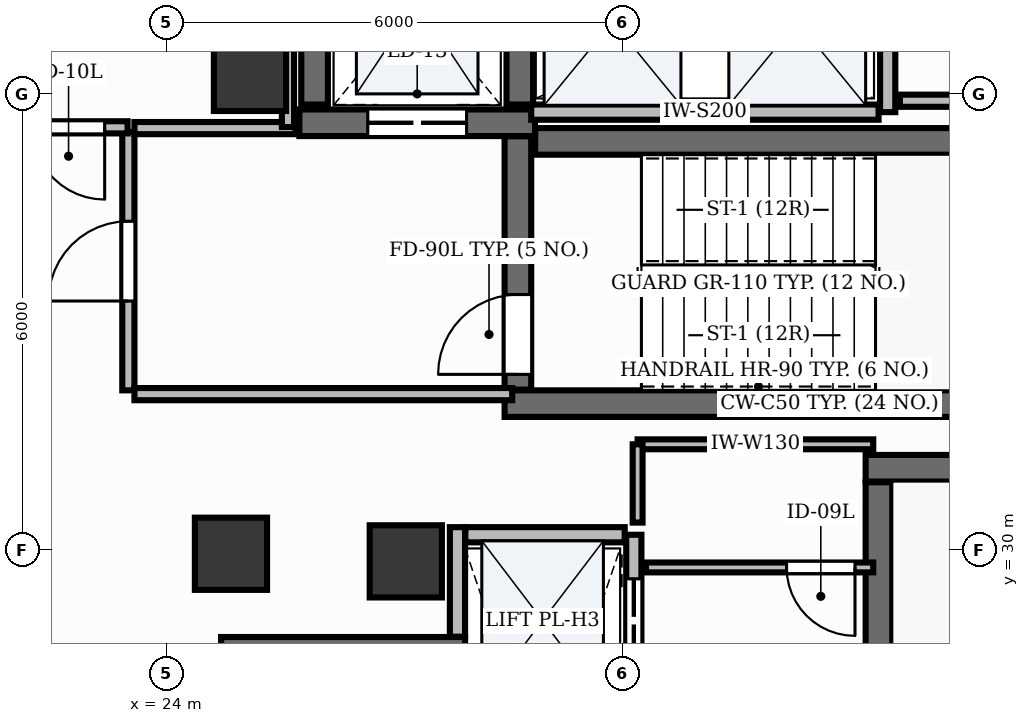
"""IFC4 building model, lengths in metres.
Left out: names, types, materials, properties, quantities, classifications, styles, units other than length and angle.
Written with IfcOpenShell. Run it as: python <this file> out.ifc"""

import sys

from ifc_helpers import new_model, si_unit, direction, frame, frame_2d, origin, origin_2d, place, context, subcontext, project, spatial, rectangle, extrude, element, fill, save


model = new_model("IFC4")
c1 = context("Model", 3, precision=1e-05, world=origin(), true_north=direction((0.0, 1.0)))
c2 = subcontext(c1, "Body", "Model", "MODEL_VIEW")
j1 = project(units=[si_unit("LENGTHUNIT", "METRE"), si_unit("PLANEANGLEUNIT", "RADIAN")], contexts=[c1])
p1 = place(None, origin())
s1 = spatial("IfcSite", under=j1, at=p1, CompositionType="ELEMENT")
p2 = place(p1, origin())
s2 = spatial("IfcBuilding", under=s1, at=p2, CompositionType="ELEMENT")
p3 = place(p2, frame((0.0, 0.0, 331.2)))
s3 = spatial("IfcBuildingStorey", under=s2, at=p3, CompositionType="ELEMENT", Elevation=331.2)
p4 = place(p3, frame((28.852, 35.375, 0.0), z_axis=(0.0, 0.0, 1.0), x_axis=(1.0, 0.0, 0.0)))
e1 = element("IfcWall", 1, at=p4, inside=s3, PredefinedType="SHEAR", context=c2, shape_type="SweptSolid", body=[
    extrude(rectangle(XDim=8.148, YDim=0.35, at=frame_2d((4.074, 0.0))), origin(), (0.0, 0.0, 1.0), 3.88),
])
p5 = place(p3, frame((28.45, 31.925, 0.0), z_axis=(0.0, 0.0, 1.0), x_axis=(1.0, 0.0, 0.0)))
e2 = element("IfcWall", 2, at=p5, inside=s3, PredefinedType="SHEAR", context=c2, shape_type="SweptSolid", body=[
    extrude(rectangle(XDim=8.55, YDim=0.35, at=frame_2d((4.275, 0.0))), origin(), (0.0, 0.0, 1.0), 3.88),
])
p6 = place(p3, frame((28.625, 32.11, 0.0), z_axis=(0.0, 0.0, 1.0), x_axis=(0.0, 1.0, 0.0)))
e3 = element("IfcWall", 3, at=p6, inside=s3, PredefinedType="SHEAR", context=c2, shape_type="SweptSolid", body=[
    extrude(rectangle(XDim=3.333, YDim=0.35, at=frame_2d((1.667, 0.0))), origin(), (0.0, 0.0, 1.0), 3.88),
])
p7 = place(p6, frame((0.2, 0.0, 0.0)))
e4 = element("IfcOpeningElement", 4, at=p7, cuts=e3, PredefinedType="OPENING", context=c2, shape_type="SweptSolid", body=[
    extrude(rectangle(XDim=1.05, YDim=2.15, at=frame_2d((0.525, 1.075))), frame((0.0, 0.19, 0.0), z_axis=(0.0, -1.0, 0.0), x_axis=(1.0, 0.0, 0.0)), (0.0, 0.0, 1.0), 0.38),
])
p8 = place(p3, frame((33.2, 31.075, 0.0), z_axis=(0.0, 0.0, 1.0), x_axis=(1.0, 0.0, 0.0)))
e5 = element("IfcWall", 5, at=p8, inside=s3, PredefinedType="SHEAR", context=c2, shape_type="SweptSolid", body=[
    extrude(rectangle(XDim=3.8, YDim=0.35, at=frame_2d((1.9, 0.0))), origin(), (0.0, 0.0, 1.0), 3.88),
])
p9 = place(p3, frame((33.375, 23.11, 0.0), z_axis=(0.0, 0.0, 1.0), x_axis=(0.0, 1.0, 0.0)))
e6 = element("IfcWall", 6, at=p9, inside=s3, PredefinedType="SHEAR", context=c2, shape_type="SweptSolid", body=[
    extrude(rectangle(XDim=7.78, YDim=0.35, at=frame_2d((3.89, 0.0))), origin(), (0.0, 0.0, 1.0), 3.88),
])
p10 = place(p9, frame((0.2, 0.0, 0.0)))
e7 = element("IfcOpeningElement", 7, at=p10, cuts=e6, PredefinedType="OPENING", context=c2, shape_type="SweptSolid", body=[
    extrude(rectangle(XDim=1.05, YDim=2.15, at=frame_2d((0.525, 1.075))), frame((0.0, 0.19, 0.0), z_axis=(0.0, -1.0, 0.0), x_axis=(1.0, 0.0, 0.0)), (0.0, 0.0, 1.0), 0.38),
])
p11 = place(p3, frame((25.75, 35.62, 0.0), z_axis=(0.0, 0.0, 1.0), x_axis=(1.0, 0.0, 0.0)))
e8 = element("IfcWall", 8, at=p11, inside=s3, PredefinedType="SHEAR", context=c2, shape_type="SweptSolid", body=[
    extrude(rectangle(XDim=3.1, YDim=0.35, at=frame_2d((1.55, 0.0))), origin(), (0.0, 0.0, 1.0), 3.88),
])
p12 = place(p11, frame((0.9, 0.0, 0.0)))
e9 = element("IfcOpeningElement", 9, at=p12, cuts=e8, PredefinedType="OPENING", context=c2, shape_type="SweptSolid", body=[
    extrude(rectangle(XDim=1.3, YDim=2.2, at=frame_2d((0.65, 1.1))), frame((0.0, 0.19, 0.0), z_axis=(0.0, -1.0, 0.0), x_axis=(1.0, 0.0, 0.0)), (0.0, 0.0, 1.0), 0.38),
])
for number, where, z_axis, x_axis in (
    (10, (25.95, 35.86, 0.0), (0.0, 0.0, 1.0), (0.0, 1.0, 0.0)),
    (11, (28.65, 35.86, 0.0), (0.0, 0.0, 1.0), (0.0, 1.0, 0.0)),
):
    element("IfcWall", number, at=place(p3, frame(where, z_axis=z_axis, x_axis=x_axis)), inside=s3, PredefinedType="SHEAR", context=c2, shape_type="SweptSolid", body=[
        extrude(rectangle(XDim=2.7, YDim=0.35, at=frame_2d((1.35, 0.0))), origin(), (0.0, 0.0, 1.0), 3.88),
    ])
p13 = place(p3, frame((24.72, 28.68, 0.0), z_axis=(0.0, 0.0, 1.0), x_axis=(1.0, 0.0, 0.0)))
e12 = element("IfcWall", 12, at=p13, inside=s3, PredefinedType="SHEAR", context=c2, shape_type="SweptSolid", body=[
    extrude(rectangle(XDim=3.21, YDim=0.35, at=frame_2d((1.605, 0.0))), origin(), (0.0, 0.0, 1.0), 3.88),
])
for number, where, z_axis, x_axis in (
    (13, (25.1, 36.25, -0.0), (0.0, 0.0, 1.0), (1.0, 0.0, 0.0)),
    (14, (24.85, 29.95, -0.0), (0.0, 0.0, 1.0), (1.0, 0.0, 0.0)),
    (15, (27.15, 29.85, -0.0), (0.0, 0.0, 1.0), (1.0, 0.0, 0.0)),
):
    element("IfcColumn", number, at=place(p3, frame(where, z_axis=z_axis, x_axis=x_axis)), inside=s3, PredefinedType="PILASTER", context=c2, shape_type="SweptSolid", body=[
        extrude(rectangle(XDim=0.95, YDim=0.95, at=origin_2d()), origin(), (0.0, 0.0, 1.0), 3.881),
    ])
p14 = place(p3, frame((27.83, 28.859, 0.0), z_axis=(0.0, 0.0, 1.0), x_axis=(0.0, 1.0, 0.0)))
e16 = element("IfcWall", 16, at=p14, inside=s3, PredefinedType="PARTITIONING", context=c2, shape_type="SweptSolid", body=[
    extrude(rectangle(XDim=1.441, YDim=0.2, at=frame_2d((0.721, 0.0))), origin(), (0.0, 0.0, 1.0), 2.22),
])
p15 = place(p3, frame((30.15, 23.85, 0.0), z_axis=(0.0, 0.0, 1.0), x_axis=(0.0, 1.0, 0.0)))
e17 = element("IfcWall", 17, at=p15, inside=s3, PredefinedType="PARTITIONING", context=c2, shape_type="SweptSolid", body=[
    extrude(rectangle(XDim=6.35, YDim=0.2, at=frame_2d((3.175, 0.0))), origin(), (0.0, 0.0, 1.0), 2.22),
])
p16 = place(p15, frame((0.58, 0.0, 0.0)))
e18 = element("IfcOpeningElement", 18, at=p16, cuts=e17, PredefinedType="OPENING", context=c2, shape_type="SweptSolid", body=[
    extrude(rectangle(XDim=1.1, YDim=2.2, at=frame_2d((0.55, 1.1))), frame((0.0, 0.115, 0.0), z_axis=(0.0, -1.0, 0.0), x_axis=(1.0, 0.0, 0.0)), (0.0, 0.0, 1.0), 0.23),
])
p17 = place(p15, frame((2.62, 0.0, 0.0)))
e19 = element("IfcOpeningElement", 19, at=p17, cuts=e17, PredefinedType="OPENING", context=c2, shape_type="SweptSolid", body=[
    extrude(rectangle(XDim=1.1, YDim=2.2, at=frame_2d((0.55, 1.1))), frame((0.0, 0.115, 0.0), z_axis=(0.0, -1.0, 0.0), x_axis=(1.0, 0.0, 0.0)), (0.0, 0.0, 1.0), 0.23),
])
p18 = place(p15, frame((4.67, 0.0, 0.0)))
e20 = element("IfcOpeningElement", 20, at=p18, cuts=e17, PredefinedType="OPENING", context=c2, shape_type="SweptSolid", body=[
    extrude(rectangle(XDim=1.1, YDim=2.2, at=frame_2d((0.55, 1.1))), frame((0.0, 0.115, 0.0), z_axis=(0.0, -1.0, 0.0), x_axis=(1.0, 0.0, 0.0)), (0.0, 0.0, 1.0), 0.23),
])
p19 = place(p3, frame((27.934, 30.2, 0.0), z_axis=(0.0, 0.0, 1.0), x_axis=(1.0, 0.0, 0.0)))
e21 = element("IfcWall", 21, at=p19, inside=s3, PredefinedType="PARTITIONING", context=c2, shape_type="SweptSolid", body=[
    extrude(rectangle(XDim=2.096, YDim=0.2, at=frame_2d((1.048, 0.0))), origin(), (0.0, 0.0, 1.0), 2.22),
])
p20 = place(p3, frame((33.49, 35.76, 0.0), z_axis=(0.0, 0.0, 1.0), x_axis=(0.0, 1.0, 0.0)))
e22 = element("IfcWall", 22, at=p20, inside=s3, PredefinedType="PARTITIONING", context=c2, shape_type="SweptSolid", body=[
    extrude(rectangle(XDim=2.38, YDim=0.2, at=frame_2d((1.19, 0.0))), origin(), (0.0, 0.0, 1.0), 2.22),
])
p21 = place(p3, frame((28.8, 35.76, 0.0), z_axis=(0.0, 0.0, 1.0), x_axis=(1.0, 0.0, 0.0)))
e23 = element("IfcWall", 23, at=p21, inside=s3, PredefinedType="PARTITIONING", context=c2, shape_type="SweptSolid", body=[
    extrude(rectangle(XDim=4.57, YDim=0.2, at=frame_2d((2.285, 0.0))), origin(), (0.0, 0.0, 1.0), 2.22),
])
p22 = place(p3, frame((23.5, 32.1, 0.0), z_axis=(0.0, 0.0, 1.0), x_axis=(0.0, 1.0, 0.0)))
e24 = element("IfcWall", 24, at=p22, inside=s3, PredefinedType="PARTITIONING", context=c2, shape_type="SweptSolid", body=[
    extrude(rectangle(XDim=3.4, YDim=0.16, at=frame_2d((1.7, 0.0))), origin(), (0.0, 0.0, 1.0), 2.22),
])
p23 = place(p22, frame((1.175, 0.0, 0.0)))
e25 = element("IfcOpeningElement", 25, at=p23, cuts=e24, PredefinedType="OPENING", context=c2, shape_type="SweptSolid", body=[
    extrude(rectangle(XDim=1.05, YDim=2.15, at=frame_2d((0.525, 1.075))), frame((0.0, 0.095, 0.0), z_axis=(0.0, -1.0, 0.0), x_axis=(1.0, 0.0, 0.0)), (0.0, 0.0, 1.0), 0.19),
])
p24 = place(p3, frame((23.58, 32.05, 0.0), z_axis=(0.0, 0.0, 1.0), x_axis=(1.0, 0.0, 0.0)))
e26 = element("IfcWall", 26, at=p24, inside=s3, PredefinedType="PARTITIONING", context=c2, shape_type="SweptSolid", body=[
    extrude(rectangle(XDim=4.97, YDim=0.16, at=frame_2d((2.485, 0.0))), origin(), (0.0, 0.0, 1.0), 2.22),
])
p25 = place(p3, frame((23.58, 35.55, 0.0), z_axis=(0.0, 0.0, 1.0), x_axis=(1.0, 0.0, 0.0)))
e27 = element("IfcWall", 27, at=p25, inside=s3, PredefinedType="PARTITIONING", context=c2, shape_type="SweptSolid", body=[
    extrude(rectangle(XDim=2.12, YDim=0.16, at=frame_2d((1.06, 0.0))), origin(), (0.0, 0.0, 1.0), 2.22),
])
p26 = place(p3, frame((33.3, 29.77, 0.0), z_axis=(0.0, 0.0, 1.0), x_axis=(-1.0, 0.0, 0.0)))
e28 = element("IfcWall", 28, at=p26, inside=s3, PredefinedType="PARTITIONING", context=c2, shape_type="SweptSolid", body=[
    extrude(rectangle(XDim=2.99, YDim=0.13, at=frame_2d((1.495, 0.0))), origin(), (0.0, 0.0, 1.0), 2.22),
])
p27 = place(p26, frame((0.24, 0.0, 0.0)))
e29 = element("IfcOpeningElement", 29, at=p27, cuts=e28, PredefinedType="OPENING", context=c2, shape_type="SweptSolid", body=[
    extrude(rectangle(XDim=0.9, YDim=2.15, at=frame_2d((0.45, 1.075))), frame((0.0, 0.08, 0.0), z_axis=(0.0, -1.0, 0.0), x_axis=(1.0, 0.0, 0.0)), (0.0, 0.0, 1.0), 0.16),
])
p28 = place(p3, frame((23.49, 35.56, 0.0), z_axis=(0.0, 0.0, 1.0), x_axis=(-1.0, 0.0, 0.0)))
e30 = element("IfcWall", 30, at=p28, inside=s3, PredefinedType="PARTITIONING", context=c2, shape_type="SweptSolid", body=[
    extrude(rectangle(XDim=1.69, YDim=0.16, at=frame_2d((0.845, 0.0))), origin(), (0.0, 0.0, 1.0), 2.22),
])
p29 = place(p28, frame((0.302, 0.0, 0.0)))
e31 = element("IfcOpeningElement", 31, at=p29, cuts=e30, PredefinedType="OPENING", context=c2, shape_type="SweptSolid", body=[
    extrude(rectangle(XDim=0.95, YDim=2.15, at=frame_2d((0.475, 1.075))), frame((0.0, 0.095, 0.0), z_axis=(0.0, -1.0, 0.0), x_axis=(1.0, 0.0, 0.0)), (0.0, 0.0, 1.0), 0.19),
])
p30 = place(p3, frame((30.2, 31.39, 0.0), z_axis=(0.0, 0.0, 1.0), x_axis=(1.0, 0.0, 0.0)))
e32 = element("IfcWall", 32, at=p30, inside=s3, PredefinedType="PARTITIONING", context=c2, shape_type="SweptSolid", body=[
    extrude(rectangle(XDim=3.1, YDim=0.13, at=frame_2d((1.55, 0.0))), origin(), (0.0, 0.0, 1.0), 2.22),
])
p31 = place(p3, frame((30.2, 30.36, 0.0), z_axis=(0.0, 0.0, 1.0), x_axis=(0.0, 1.0, 0.0)))
e33 = element("IfcWall", 33, at=p31, inside=s3, PredefinedType="PARTITIONING", context=c2, shape_type="SweptSolid", body=[
    extrude(rectangle(XDim=1.03, YDim=0.13, at=frame_2d((0.515, 0.0))), origin(), (0.0, 0.0, 1.0), 2.22),
])
p32 = place(p3, frame((37.35, 35.91, 0.0), z_axis=(0.0, 0.0, 1.0), x_axis=(-1.0, 0.0, 0.0)))
e34 = element("IfcWall", 34, at=p32, inside=s3, PredefinedType="PARTITIONING", context=c2, shape_type="SweptSolid", body=[
    extrude(rectangle(XDim=3.7, YDim=0.16, at=frame_2d((1.85, 0.0))), origin(), (0.0, 0.0, 1.0), 2.22),
])
p33 = place(p3, frame((25.6, 39.376, 0.0), z_axis=(0.0, 0.0, 1.0), x_axis=(0.0, -1.0, 0.0)))
e35 = element("IfcWall", 35, at=p33, inside=s3, PredefinedType="PARTITIONING", context=c2, shape_type="SweptSolid", body=[
    extrude(rectangle(XDim=3.812, YDim=0.16, at=frame_2d((1.906, 0.0))), origin(), (0.0, 0.0, 1.0), 2.22),
])
p34 = place(p7, origin())
e36 = element("IfcDoor", 36, at=p34, inside=s3, OperationType="SINGLE_SWING_LEFT", PredefinedType="DOOR", context=c2, shape_type="SweptSolid", body=[
    extrude(rectangle(XDim=1.05, YDim=2.15, at=frame_2d((0.525, 1.075))), frame((0.0, 0.025, 0.0), z_axis=(0.0, -1.0, 0.0), x_axis=(1.0, 0.0, 0.0)), (0.0, 0.0, 1.0), 0.05),
])
fill(e4, e36)
p35 = place(p18, origin())
e37 = element("IfcDoor", 37, at=p35, inside=s3, OperationType="DOUBLE_DOOR_SLIDING", PredefinedType="DOOR", context=c2, shape_type="SweptSolid", body=[
    extrude(rectangle(XDim=1.1, YDim=2.2, at=frame_2d((0.55, 1.1))), frame((0.0, 0.025, 0.0), z_axis=(0.0, -1.0, 0.0), x_axis=(1.0, 0.0, 0.0)), (0.0, 0.0, 1.0), 0.05),
])
fill(e20, e37)
p36 = place(p12, origin())
e38 = element("IfcDoor", 38, at=p36, inside=s3, OperationType="DOUBLE_DOOR_SLIDING", PredefinedType="DOOR", context=c2, shape_type="SweptSolid", body=[
    extrude(rectangle(XDim=1.3, YDim=2.2, at=frame_2d((0.65, 1.1))), frame((0.0, 0.025, 0.0), z_axis=(0.0, -1.0, 0.0), x_axis=(1.0, 0.0, 0.0)), (0.0, 0.0, 1.0), 0.05),
])
fill(e9, e38)
p37 = place(p23, origin())
e39 = element("IfcDoor", 39, at=p37, inside=s3, OperationType="SINGLE_SWING_LEFT", PredefinedType="DOOR", context=c2, shape_type="SweptSolid", body=[
    extrude(rectangle(XDim=1.05, YDim=2.15, at=frame_2d((0.525, 1.075))), frame((0.0, 0.025, 0.0), z_axis=(0.0, -1.0, 0.0), x_axis=(1.0, 0.0, 0.0)), (0.0, 0.0, 1.0), 0.05),
])
fill(e25, e39)
p38 = place(p27, origin())
e40 = element("IfcDoor", 40, at=p38, inside=s3, OperationType="SINGLE_SWING_LEFT", PredefinedType="DOOR", context=c2, shape_type="SweptSolid", body=[
    extrude(rectangle(XDim=0.9, YDim=2.15, at=frame_2d((0.45, 1.075))), frame((0.0, 0.025, 0.0), z_axis=(0.0, -1.0, 0.0), x_axis=(1.0, 0.0, 0.0)), (0.0, 0.0, 1.0), 0.05),
])
fill(e29, e40)
p39 = place(p29, origin())
e41 = element("IfcDoor", 41, at=p39, inside=s3, OperationType="SINGLE_SWING_LEFT", PredefinedType="DOOR", context=c2, shape_type="SweptSolid", body=[
    extrude(rectangle(XDim=0.95, YDim=2.15, at=frame_2d((0.475, 1.075))), frame((0.0, 0.025, 0.0), z_axis=(0.0, -1.0, 0.0), x_axis=(1.0, 0.0, 0.0)), (0.0, 0.0, 1.0), 0.05),
])
fill(e31, e41)
save(model, sys.argv[1])
